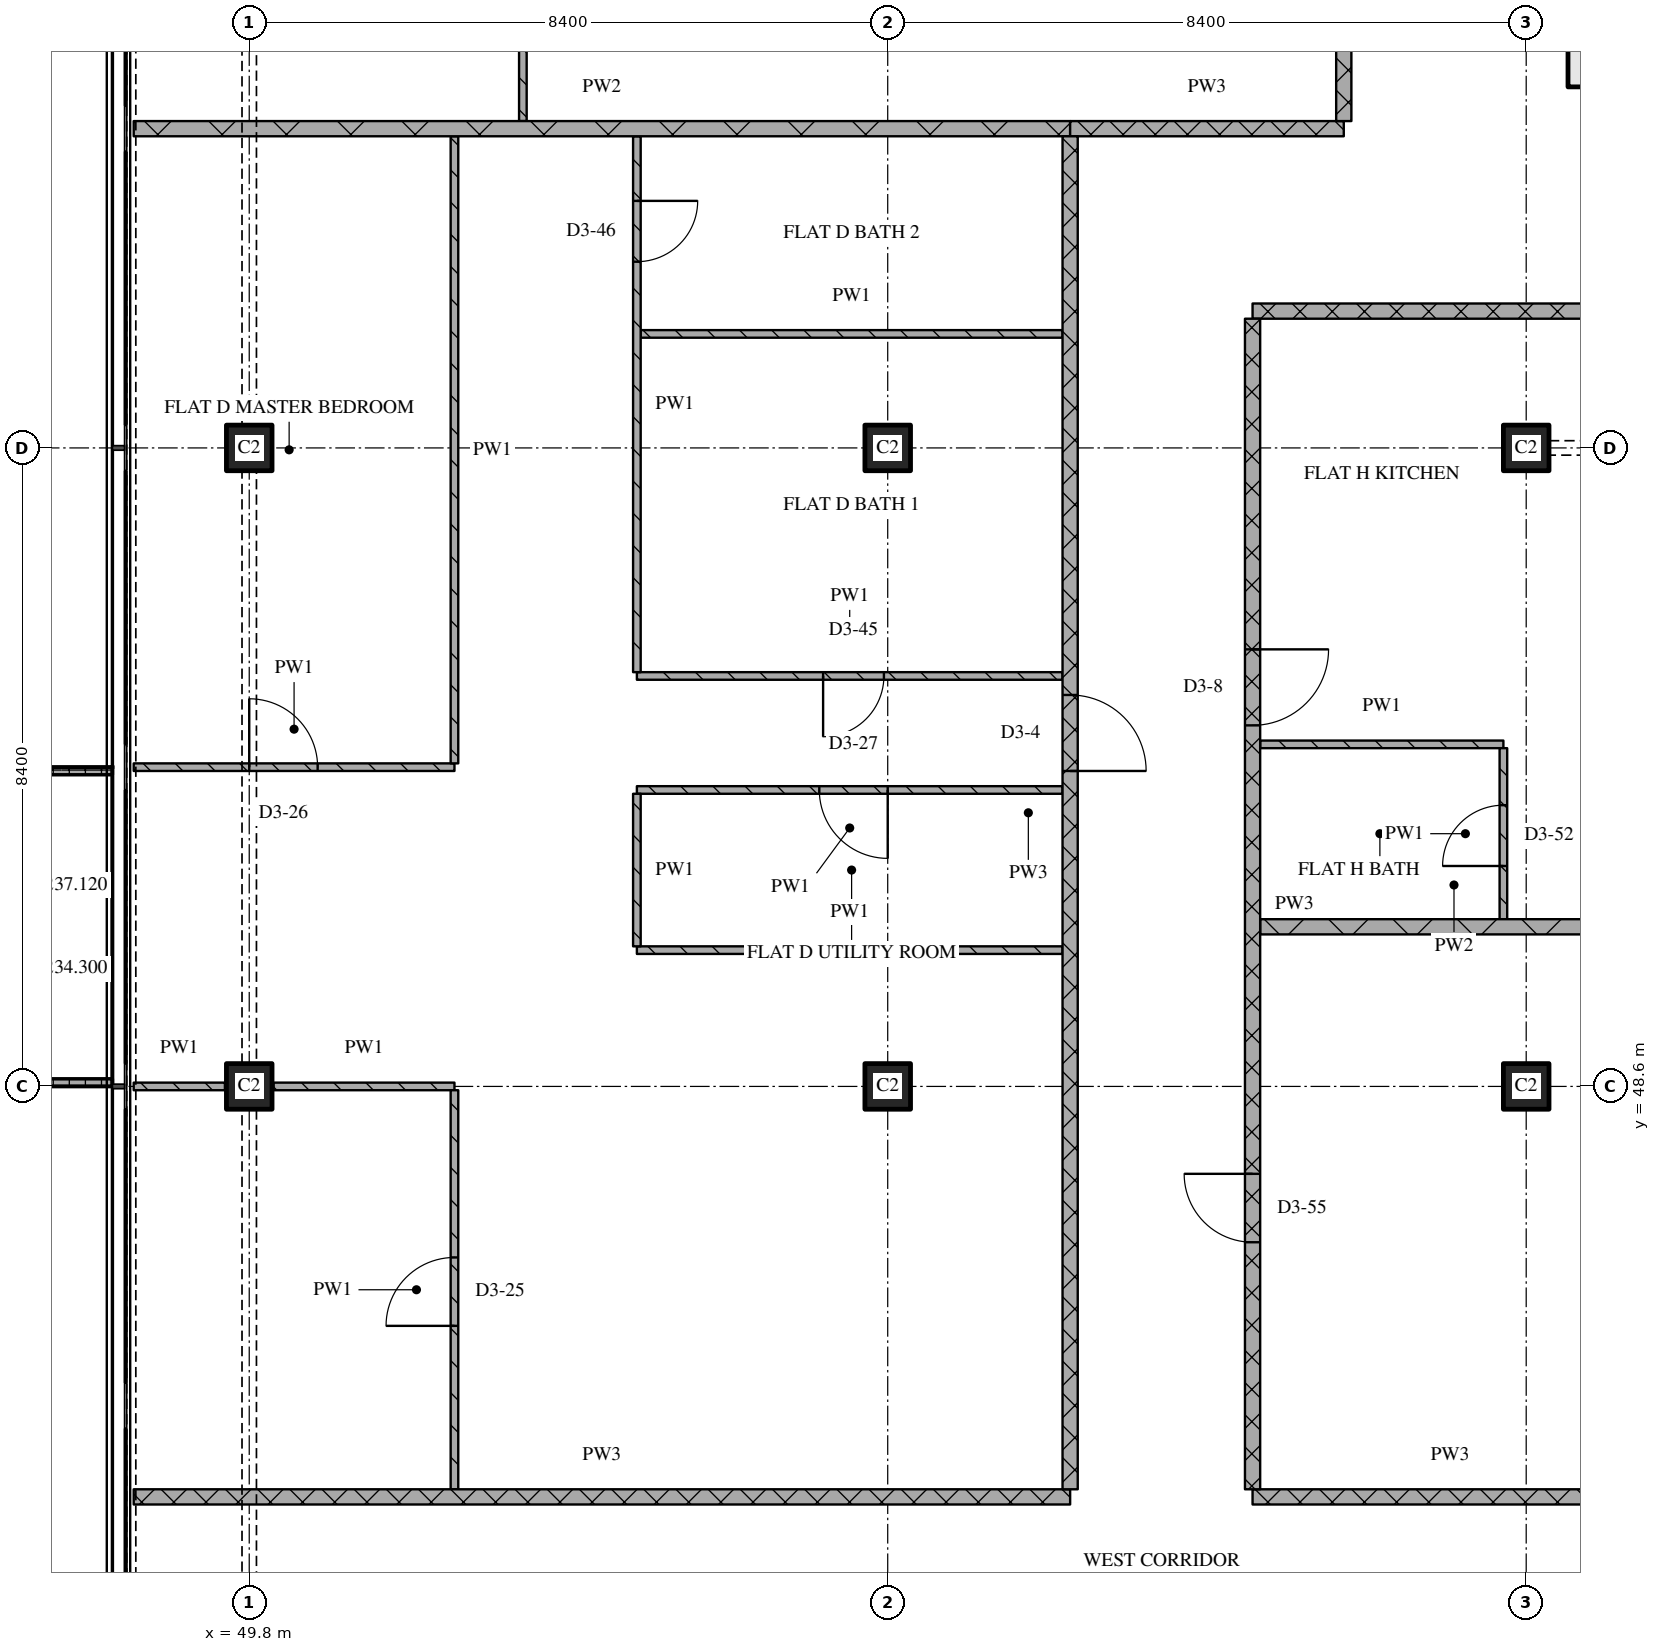
"""IFC4 building model, lengths in metres.
Left out: names, types, materials, properties, quantities, classifications, styles, units other than length and angle.
Written with IfcOpenShell. Run it as: python <this file> out.ifc"""

import sys

from ifc_helpers import new_model, si_unit, direction, frame, frame_2d, origin, origin_2d, place, context, subcontext, project, spatial, polyline, rectangle, outline, extrude, element, fill, save


model = new_model("IFC4")
c1 = context("Model", 3, precision=1e-05, world=origin(), true_north=direction((0.0, 1.0)))
c2 = subcontext(c1, "Body", "Model", "MODEL_VIEW")
j1 = project(units=[si_unit("LENGTHUNIT", "METRE"), si_unit("PLANEANGLEUNIT", "RADIAN")], contexts=[c1])
p1 = place(None, origin())
s1 = spatial("IfcSite", under=j1, at=p1, CompositionType="ELEMENT")
p2 = place(p1, origin())
s2 = spatial("IfcBuilding", under=s1, at=p2, CompositionType="ELEMENT")
p3 = place(p2, frame((0.0, 0.0, 234.3)))
s3 = spatial("IfcBuildingStorey", under=s2, at=p3, CompositionType="ELEMENT", Elevation=234.3)
for number, where, z_axis, x_axis in (
    (1, (49.8, 48.6, 0.0), (0.0, 0.0, 1.0), (1.0, 0.0, 0.0)),
    (2, (49.8, 57.0, 0.0), (0.0, 0.0, 1.0), (1.0, 0.0, 0.0)),
    (3, (58.2, 48.6, 0.0), (0.0, 0.0, 1.0), (1.0, 0.0, 0.0)),
    (4, (58.2, 57.0, 0.0), (0.0, 0.0, 1.0), (1.0, 0.0, 0.0)),
    (5, (66.6, 48.6, 0.0), (0.0, 0.0, 1.0), (1.0, 0.0, 0.0)),
    (6, (66.6, 57.0, 0.0), (0.0, 0.0, 1.0), (1.0, 0.0, 0.0)),
):
    element("IfcColumn", number, at=place(p3, frame(where, z_axis=z_axis, x_axis=x_axis)), inside=s3, PredefinedType="COLUMN", context=c2, shape_type="SweptSolid", body=[
        extrude(rectangle(XDim=0.6, YDim=0.6, at=origin_2d()), origin(), (0.0, 0.0, 1.0), 3.6),
    ])
p4 = place(p3, origin())
e7 = element("IfcWall", 7, at=p4, inside=s3, PredefinedType="SOLIDWALL", context=c2, shape_type="SweptSolid", body=[
    extrude(outline(polyline([(48.0, 52.8), (48.0, 52.7), (46.367, 52.7), (46.367, 48.7), (48.0, 48.7), (48.0, 48.6), (46.267, 48.6), (46.267, 52.8), (48.0, 52.8)])), origin(), (0.0, 0.0, 1.0), 1.0),
])
p5 = place(p3, frame((67.15, 62.075, 0.0), z_axis=(0.0, 0.0, 1.0), x_axis=(1.0, 0.0, 0.0)))
e8 = element("IfcWall", 8, at=p5, inside=s3, PredefinedType="SOLIDWALL", context=c2, shape_type="SweptSolid", body=[
    extrude(rectangle(XDim=40.9, YDim=0.65, at=frame_2d((20.45, 0.0))), origin(), (0.0, 0.0, 1.0), 3.32),
])
p6 = place(p5, frame((20.8, 0.0, 0.0)))
e9 = element("IfcOpeningElement", 9, at=p6, cuts=e8, PredefinedType="OPENING", context=c2, shape_type="SweptSolid", body=[
    extrude(rectangle(XDim=1.8, YDim=2.1, at=frame_2d((0.9, 1.05))), frame((0.0, 0.335, 0.0), z_axis=(0.0, -1.0, 0.0), x_axis=(1.0, 0.0, 0.0)), (0.0, 0.0, 1.0), 0.67),
])
p7 = place(p3, frame((48.28, 43.2, 0.0), z_axis=(0.0, 0.0, 1.0), x_axis=(1.0, 0.0, 0.0)))
e10 = element("IfcWall", 10, at=p7, inside=s3, PredefinedType="PARTITIONING", context=c2, shape_type="SweptSolid", body=[
    extrude(rectangle(XDim=12.32, YDim=0.2, at=frame_2d((6.16, 0.0))), origin(), (0.0, 0.0, 1.0), 3.32),
])
p8 = place(p3, frame((63.0, 43.2, 0.0), z_axis=(0.0, 0.0, 1.0), x_axis=(1.0, 0.0, 0.0)))
e11 = element("IfcWall", 11, at=p8, inside=s3, PredefinedType="PARTITIONING", context=c2, shape_type="SweptSolid", body=[
    extrude(rectangle(XDim=5.2, YDim=0.2, at=frame_2d((2.6, 0.0))), origin(), (0.0, 0.0, 1.0), 3.32),
])
p9 = place(p3, frame((48.28, 48.6, 0.0), z_axis=(0.0, 0.0, 1.0), x_axis=(1.0, 0.0, 0.0)))
e12 = element("IfcWall", 12, at=p9, inside=s3, PredefinedType="PARTITIONING", context=c2, shape_type="SweptSolid", body=[
    extrude(rectangle(XDim=1.2, YDim=0.1, at=frame_2d((0.6, 0.0))), origin(), (0.0, 0.0, 1.0), 3.32),
])
p10 = place(p3, frame((50.12, 48.6, 0.0), z_axis=(0.0, 0.0, 1.0), x_axis=(1.0, 0.0, 0.0)))
e13 = element("IfcWall", 13, at=p10, inside=s3, PredefinedType="PARTITIONING", context=c2, shape_type="SweptSolid", body=[
    extrude(rectangle(XDim=2.38, YDim=0.1, at=frame_2d((1.19, 0.0))), origin(), (0.0, 0.0, 1.0), 3.32),
])
p11 = place(p3, frame((54.9, 50.393, 0.0), z_axis=(0.0, 0.0, 1.0), x_axis=(1.0, 0.0, 0.0)))
e14 = element("IfcWall", 14, at=p11, inside=s3, PredefinedType="PARTITIONING", context=c2, shape_type="SweptSolid", body=[
    extrude(rectangle(XDim=5.6, YDim=0.1, at=frame_2d((2.8, 0.0))), origin(), (0.0, 0.0, 1.0), 3.32),
])
p12 = place(p3, frame((63.1, 50.7, 0.0), z_axis=(0.0, 0.0, 1.0), x_axis=(1.0, 0.0, 0.0)))
e15 = element("IfcWall", 15, at=p12, inside=s3, PredefinedType="PARTITIONING", context=c2, shape_type="SweptSolid", body=[
    extrude(rectangle(XDim=5.1, YDim=0.2, at=frame_2d((2.55, 0.0))), origin(), (0.0, 0.0, 1.0), 3.32),
])
p13 = place(p3, frame((60.5, 52.5, 0.0), z_axis=(0.0, 0.0, 1.0), x_axis=(-1.0, 0.0, 0.0)))
e16 = element("IfcWall", 16, at=p13, inside=s3, PredefinedType="PARTITIONING", context=c2, shape_type="SweptSolid", body=[
    extrude(rectangle(XDim=5.6, YDim=0.1, at=frame_2d((2.8, 0.0))), origin(), (0.0, 0.0, 1.0), 3.32),
])
p14 = place(p13, frame((2.3, 0.0, 0.0)))
e17 = element("IfcOpeningElement", 17, at=p14, cuts=e16, PredefinedType="OPENING", context=c2, shape_type="SweptSolid", body=[
    extrude(rectangle(XDim=0.9, YDim=2.1, at=frame_2d((0.45, 1.05))), frame((0.0, 0.06, 0.0), z_axis=(0.0, -1.0, 0.0), x_axis=(1.0, 0.0, 0.0)), (0.0, 0.0, 1.0), 0.12),
])
p15 = place(p3, frame((48.28, 52.8, 0.0), z_axis=(0.0, 0.0, 1.0), x_axis=(1.0, 0.0, 0.0)))
e18 = element("IfcWall", 18, at=p15, inside=s3, PredefinedType="PARTITIONING", context=c2, shape_type="SweptSolid", body=[
    extrude(rectangle(XDim=4.22, YDim=0.1, at=frame_2d((2.11, 0.0))), origin(), (0.0, 0.0, 1.0), 3.32),
])
p16 = place(p15, frame((1.52, 0.0, 0.0)))
e19 = element("IfcOpeningElement", 19, at=p16, cuts=e18, PredefinedType="OPENING", context=c2, shape_type="SweptSolid", body=[
    extrude(rectangle(XDim=0.9, YDim=2.1, at=frame_2d((0.45, 1.05))), frame((0.0, 0.06, 0.0), z_axis=(0.0, -1.0, 0.0), x_axis=(1.0, 0.0, 0.0)), (0.0, 0.0, 1.0), 0.12),
])
p17 = place(p3, frame((63.1, 53.1, 0.0), z_axis=(0.0, 0.0, 1.0), x_axis=(1.0, 0.0, 0.0)))
e20 = element("IfcWall", 20, at=p17, inside=s3, PredefinedType="PARTITIONING", context=c2, shape_type="SweptSolid", body=[
    extrude(rectangle(XDim=3.2, YDim=0.1, at=frame_2d((1.6, 0.0))), origin(), (0.0, 0.0, 1.0), 3.32),
])
p18 = place(p3, frame((54.9, 54.0, 0.0), z_axis=(0.0, 0.0, 1.0), x_axis=(1.0, 0.0, 0.0)))
e21 = element("IfcWall", 21, at=p18, inside=s3, PredefinedType="PARTITIONING", context=c2, shape_type="SweptSolid", body=[
    extrude(rectangle(XDim=5.6, YDim=0.1, at=frame_2d((2.8, 0.0))), origin(), (0.0, 0.0, 1.0), 3.32),
])
p19 = place(p18, frame((2.45, 0.0, 0.0)))
e22 = element("IfcOpeningElement", 22, at=p19, cuts=e21, PredefinedType="OPENING", context=c2, shape_type="SweptSolid", body=[
    extrude(rectangle(XDim=0.8, YDim=2.1, at=frame_2d((0.4, 1.05))), frame((0.0, 0.06, 0.0), z_axis=(0.0, -1.0, 0.0), x_axis=(1.0, 0.0, 0.0)), (0.0, 0.0, 1.0), 0.12),
])
p20 = place(p3, frame((54.95, 58.5, 0.0), z_axis=(0.0, 0.0, 1.0), x_axis=(1.0, 0.0, 0.0)))
e23 = element("IfcWall", 23, at=p20, inside=s3, PredefinedType="PARTITIONING", context=c2, shape_type="SweptSolid", body=[
    extrude(rectangle(XDim=5.55, YDim=0.1, at=frame_2d((2.775, 0.0))), origin(), (0.0, 0.0, 1.0), 3.32),
])
p21 = place(p3, frame((63.0, 58.8, 0.0), z_axis=(0.0, 0.0, 1.0), x_axis=(1.0, 0.0, 0.0)))
e24 = element("IfcWall", 24, at=p21, inside=s3, PredefinedType="PARTITIONING", context=c2, shape_type="SweptSolid", body=[
    extrude(rectangle(XDim=10.8, YDim=0.2, at=frame_2d((5.4, 0.0))), origin(), (0.0, 0.0, 1.0), 3.32),
])
p22 = place(p3, frame((60.6, 61.2, 0.0), z_axis=(0.0, 0.0, 1.0), x_axis=(1.0, 0.0, 0.0)))
e25 = element("IfcWall", 25, at=p22, inside=s3, PredefinedType="PARTITIONING", context=c2, shape_type="SweptSolid", body=[
    extrude(rectangle(XDim=3.6, YDim=0.2, at=frame_2d((1.8, 0.0))), origin(), (0.0, 0.0, 1.0), 3.32),
])
p23 = place(p3, frame((48.28, 61.2, 0.0), z_axis=(0.0, 0.0, 1.0), x_axis=(1.0, 0.0, 0.0)))
e26 = element("IfcWall", 26, at=p23, inside=s3, PredefinedType="PARTITIONING", context=c2, shape_type="SweptSolid", body=[
    extrude(rectangle(XDim=12.32, YDim=0.2, at=frame_2d((6.16, 0.0))), origin(), (0.0, 0.0, 1.0), 3.32),
])
p24 = place(p3, frame((52.5, 43.3, 0.0), z_axis=(0.0, 0.0, 1.0), x_axis=(0.0, 1.0, 0.0)))
e27 = element("IfcWall", 27, at=p24, inside=s3, PredefinedType="PARTITIONING", context=c2, shape_type="SweptSolid", body=[
    extrude(rectangle(XDim=5.25, YDim=0.1, at=frame_2d((2.625, 0.0))), origin(), (0.0, 0.0, 1.0), 3.32),
])
p25 = place(p24, frame((2.15, 0.0, 0.0)))
e28 = element("IfcOpeningElement", 28, at=p25, cuts=e27, PredefinedType="OPENING", context=c2, shape_type="SweptSolid", body=[
    extrude(rectangle(XDim=0.9, YDim=2.1, at=frame_2d((0.45, 1.05))), frame((0.0, 0.06, 0.0), z_axis=(0.0, -1.0, 0.0), x_axis=(1.0, 0.0, 0.0)), (0.0, 0.0, 1.0), 0.12),
])
p26 = place(p3, frame((52.5, 61.1, 0.0), z_axis=(0.0, 0.0, 1.0), x_axis=(0.0, -1.0, 0.0)))
e29 = element("IfcWall", 29, at=p26, inside=s3, PredefinedType="PARTITIONING", context=c2, shape_type="SweptSolid", body=[
    extrude(rectangle(XDim=8.25, YDim=0.1, at=frame_2d((4.125, 0.0))), origin(), (0.0, 0.0, 1.0), 3.32),
])
p27 = place(p3, frame((53.4, 61.3, 0.0), z_axis=(0.0, 0.0, 1.0), x_axis=(0.0, 1.0, 0.0)))
e30 = element("IfcWall", 30, at=p27, inside=s3, PredefinedType="PARTITIONING", context=c2, shape_type="SweptSolid", body=[
    extrude(rectangle(XDim=8.25, YDim=0.1, at=frame_2d((4.125, 0.0))), origin(), (0.0, 0.0, 1.0), 3.32),
])
p28 = place(p27, frame((3.65, 0.0, 0.0)))
e31 = element("IfcOpeningElement", 31, at=p28, cuts=e30, PredefinedType="OPENING", context=c2, shape_type="SweptSolid", body=[
    extrude(rectangle(XDim=0.9, YDim=2.1, at=frame_2d((0.45, 1.05))), frame((0.0, 0.06, 0.0), z_axis=(0.0, -1.0, 0.0), x_axis=(1.0, 0.0, 0.0)), (0.0, 0.0, 1.0), 0.12),
])
p29 = place(p3, frame((54.9, 52.45, 0.0), z_axis=(0.0, 0.0, 1.0), x_axis=(0.0, -1.0, 0.0)))
e32 = element("IfcWall", 32, at=p29, inside=s3, PredefinedType="PARTITIONING", context=c2, shape_type="SweptSolid", body=[
    extrude(rectangle(XDim=2.007, YDim=0.1, at=frame_2d((1.003, 0.0))), origin(), (0.0, 0.0, 1.0), 3.32),
])
p30 = place(p3, frame((54.9, 61.1, 0.0), z_axis=(0.0, 0.0, 1.0), x_axis=(0.0, -1.0, 0.0)))
e33 = element("IfcWall", 33, at=p30, inside=s3, PredefinedType="PARTITIONING", context=c2, shape_type="SweptSolid", body=[
    extrude(rectangle(XDim=7.05, YDim=0.1, at=frame_2d((3.525, 0.0))), origin(), (0.0, 0.0, 1.0), 3.32),
])
p31 = place(p30, frame((0.85, 0.0, 0.0)))
e34 = element("IfcOpeningElement", 34, at=p31, cuts=e33, PredefinedType="OPENING", context=c2, shape_type="SweptSolid", body=[
    extrude(rectangle(XDim=0.8, YDim=2.1, at=frame_2d((0.4, 1.05))), frame((0.0, 0.06, 0.0), z_axis=(0.0, -1.0, 0.0), x_axis=(1.0, 0.0, 0.0)), (0.0, 0.0, 1.0), 0.12),
])
p32 = place(p3, frame((60.6, 43.3, 0.0), z_axis=(0.0, 0.0, 1.0), x_axis=(0.0, 1.0, 0.0)))
e35 = element("IfcWall", 35, at=p32, inside=s3, PredefinedType="PARTITIONING", context=c2, shape_type="SweptSolid", body=[
    extrude(rectangle(XDim=17.8, YDim=0.2, at=frame_2d((8.9, 0.0))), origin(), (0.0, 0.0, 1.0), 3.32),
])
p33 = place(p32, frame((9.45, 0.0, 0.0)))
e36 = element("IfcOpeningElement", 36, at=p33, cuts=e35, PredefinedType="OPENING", context=c2, shape_type="SweptSolid", body=[
    extrude(rectangle(XDim=1.0, YDim=2.1, at=frame_2d((0.5, 1.05))), frame((0.0, 0.11, 0.0), z_axis=(0.0, -1.0, 0.0), x_axis=(1.0, 0.0, 0.0)), (0.0, 0.0, 1.0), 0.22),
])
p34 = place(p3, frame((63.0, 58.7, 0.0), z_axis=(0.0, 0.0, 1.0), x_axis=(0.0, -1.0, 0.0)))
e37 = element("IfcWall", 37, at=p34, inside=s3, PredefinedType="PARTITIONING", context=c2, shape_type="SweptSolid", body=[
    extrude(rectangle(XDim=15.4, YDim=0.2, at=frame_2d((7.7, 0.0))), origin(), (0.0, 0.0, 1.0), 3.32),
])
p35 = place(p34, frame((4.35, 0.0, 0.0)))
e38 = element("IfcOpeningElement", 38, at=p35, cuts=e37, PredefinedType="OPENING", context=c2, shape_type="SweptSolid", body=[
    extrude(rectangle(XDim=1.0, YDim=2.1, at=frame_2d((0.5, 1.05))), frame((0.0, 0.11, 0.0), z_axis=(0.0, -1.0, 0.0), x_axis=(1.0, 0.0, 0.0)), (0.0, 0.0, 1.0), 0.22),
])
p36 = place(p34, frame((11.25, 0.0, 0.0)))
e39 = element("IfcOpeningElement", 39, at=p36, cuts=e37, PredefinedType="OPENING", context=c2, shape_type="SweptSolid", body=[
    extrude(rectangle(XDim=0.9, YDim=2.1, at=frame_2d((0.45, 1.05))), frame((0.0, 0.11, 0.0), z_axis=(0.0, -1.0, 0.0), x_axis=(1.0, 0.0, 0.0)), (0.0, 0.0, 1.0), 0.22),
])
p37 = place(p3, frame((64.2, 61.3, 0.0), z_axis=(0.0, 0.0, 1.0), x_axis=(0.0, 1.0, 0.0)))
e40 = element("IfcWall", 40, at=p37, inside=s3, PredefinedType="PARTITIONING", context=c2, shape_type="SweptSolid", body=[
    extrude(rectangle(XDim=14.02, YDim=0.2, at=frame_2d((7.01, 0.0))), origin(), (0.0, 0.0, 1.0), 3.32),
])
p38 = place(p37, frame((7.35, 0.0, 0.0)))
e41 = element("IfcOpeningElement", 41, at=p38, cuts=e40, PredefinedType="OPENING", context=c2, shape_type="SweptSolid", body=[
    extrude(rectangle(XDim=1.0, YDim=2.1, at=frame_2d((0.5, 1.05))), frame((0.0, 0.11, 0.0), z_axis=(0.0, -1.0, 0.0), x_axis=(1.0, 0.0, 0.0)), (0.0, 0.0, 1.0), 0.22),
])
p39 = place(p3, frame((66.3, 50.8, 0.0), z_axis=(0.0, 0.0, 1.0), x_axis=(0.0, 1.0, 0.0)))
e42 = element("IfcWall", 42, at=p39, inside=s3, PredefinedType="PARTITIONING", context=c2, shape_type="SweptSolid", body=[
    extrude(rectangle(XDim=2.25, YDim=0.1, at=frame_2d((1.125, 0.0))), origin(), (0.0, 0.0, 1.0), 3.32),
])
p40 = place(p39, frame((0.7, 0.0, 0.0)))
e43 = element("IfcOpeningElement", 43, at=p40, cuts=e42, PredefinedType="OPENING", context=c2, shape_type="SweptSolid", body=[
    extrude(rectangle(XDim=0.8, YDim=2.1, at=frame_2d((0.4, 1.05))), frame((0.0, 0.06, 0.0), z_axis=(0.0, -1.0, 0.0), x_axis=(1.0, 0.0, 0.0)), (0.0, 0.0, 1.0), 0.12),
])
p41 = place(p14, origin())
e44 = element("IfcDoor", 44, at=p41, inside=s3, OperationType="SINGLE_SWING_LEFT", PredefinedType="DOOR", context=c2, shape_type="SweptSolid", body=[
    extrude(rectangle(XDim=0.9, YDim=2.1, at=frame_2d((0.45, 1.05))), frame((0.0, 0.025, 0.0), z_axis=(0.0, -1.0, 0.0), x_axis=(1.0, 0.0, 0.0)), (0.0, 0.0, 1.0), 0.05),
])
fill(e17, e44)
p42 = place(p16, origin())
e45 = element("IfcDoor", 45, at=p42, inside=s3, OperationType="SINGLE_SWING_LEFT", PredefinedType="DOOR", context=c2, shape_type="SweptSolid", body=[
    extrude(rectangle(XDim=0.9, YDim=2.1, at=frame_2d((0.45, 1.05))), frame((0.0, 0.025, 0.0), z_axis=(0.0, -1.0, 0.0), x_axis=(1.0, 0.0, 0.0)), (0.0, 0.0, 1.0), 0.05),
])
fill(e19, e45)
p43 = place(p19, origin())
e46 = element("IfcDoor", 46, at=p43, inside=s3, OperationType="SINGLE_SWING_RIGHT", PredefinedType="DOOR", context=c2, shape_type="SweptSolid", body=[
    extrude(rectangle(XDim=0.8, YDim=2.1, at=frame_2d((0.4, 1.05))), frame((0.0, 0.025, 0.0), z_axis=(0.0, -1.0, 0.0), x_axis=(1.0, 0.0, 0.0)), (0.0, 0.0, 1.0), 0.05),
])
fill(e22, e46)
p44 = place(p25, origin())
e47 = element("IfcDoor", 47, at=p44, inside=s3, OperationType="SINGLE_SWING_LEFT", PredefinedType="DOOR", context=c2, shape_type="SweptSolid", body=[
    extrude(rectangle(XDim=0.9, YDim=2.1, at=frame_2d((0.45, 1.05))), frame((0.0, 0.025, 0.0), z_axis=(0.0, -1.0, 0.0), x_axis=(1.0, 0.0, 0.0)), (0.0, 0.0, 1.0), 0.05),
])
fill(e28, e47)
p45 = place(p31, origin())
e48 = element("IfcDoor", 48, at=p45, inside=s3, OperationType="SINGLE_SWING_LEFT", PredefinedType="DOOR", context=c2, shape_type="SweptSolid", body=[
    extrude(rectangle(XDim=0.8, YDim=2.1, at=frame_2d((0.4, 1.05))), frame((0.0, 0.025, 0.0), z_axis=(0.0, -1.0, 0.0), x_axis=(1.0, 0.0, 0.0)), (0.0, 0.0, 1.0), 0.05),
])
fill(e34, e48)
p46 = place(p33, origin())
e49 = element("IfcDoor", 49, at=p46, inside=s3, OperationType="SINGLE_SWING_RIGHT", PredefinedType="DOOR", context=c2, shape_type="SweptSolid", body=[
    extrude(rectangle(XDim=1.0, YDim=2.1, at=frame_2d((0.5, 1.05))), frame((0.0, 0.025, 0.0), z_axis=(0.0, -1.0, 0.0), x_axis=(1.0, 0.0, 0.0)), (0.0, 0.0, 1.0), 0.05),
])
fill(e36, e49)
p47 = place(p35, origin())
e50 = element("IfcDoor", 50, at=p47, inside=s3, OperationType="SINGLE_SWING_LEFT", PredefinedType="DOOR", context=c2, shape_type="SweptSolid", body=[
    extrude(rectangle(XDim=1.0, YDim=2.1, at=frame_2d((0.5, 1.05))), frame((0.0, 0.025, 0.0), z_axis=(0.0, -1.0, 0.0), x_axis=(1.0, 0.0, 0.0)), (0.0, 0.0, 1.0), 0.05),
])
fill(e38, e50)
p48 = place(p36, origin())
e51 = element("IfcDoor", 51, at=p48, inside=s3, OperationType="SINGLE_SWING_RIGHT", PredefinedType="DOOR", context=c2, shape_type="SweptSolid", body=[
    extrude(rectangle(XDim=0.9, YDim=2.1, at=frame_2d((0.45, 1.05))), frame((0.0, 0.025, 0.0), z_axis=(0.0, -1.0, 0.0), x_axis=(1.0, 0.0, 0.0)), (0.0, 0.0, 1.0), 0.05),
])
fill(e39, e51)
p49 = place(p40, origin())
e52 = element("IfcDoor", 52, at=p49, inside=s3, OperationType="SINGLE_SWING_LEFT", PredefinedType="DOOR", context=c2, shape_type="SweptSolid", body=[
    extrude(rectangle(XDim=0.8, YDim=2.1, at=frame_2d((0.4, 1.05))), frame((0.0, 0.025, 0.0), z_axis=(0.0, -1.0, 0.0), x_axis=(1.0, 0.0, 0.0)), (0.0, 0.0, 1.0), 0.05),
])
fill(e43, e52)
save(model, sys.argv[1])
